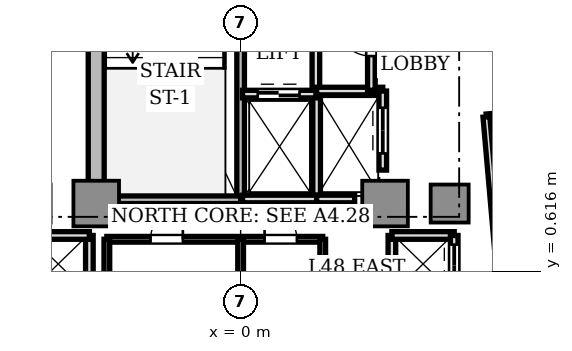
"""IFC4 building model, lengths in metres.
Left out: names, types, materials, properties, quantities, classifications, styles, units other than length and angle.
Written with IfcOpenShell. Run it as: python <this file> out.ifc"""

import sys

from ifc_helpers import new_model, si_unit, direction, frame, frame_2d, origin, origin_2d, place, context, subcontext, project, spatial, rectangle, extrude, source, transform, mapped, element, fill, save


model = new_model("IFC4")
c1 = context("Model", 3, precision=1e-05, world=origin(), true_north=direction((0.0, 1.0)))
c2 = subcontext(c1, "Body", "Model", "MODEL_VIEW")
j1 = project(units=[si_unit("LENGTHUNIT", "METRE"), si_unit("PLANEANGLEUNIT", "RADIAN")], contexts=[c1])
p1 = place(None, origin())
s1 = spatial("IfcSite", under=j1, at=p1, CompositionType="ELEMENT")
p2 = place(p1, origin())
s2 = spatial("IfcBuilding", under=s1, at=p2, CompositionType="ELEMENT")
p3 = place(p2, frame((0.0, 0.0, 175.2)))
s3 = spatial("IfcBuildingStorey", under=s2, at=p3, CompositionType="ELEMENT", Elevation=175.2)
p4 = place(p3, frame((-3.8, 2.85, 0.0), z_axis=(0.0, 0.0, 1.0), x_axis=(0.0, 1.0, 0.0)))
e1 = element("IfcWall", 1, at=p4, inside=s3, PredefinedType="SHEAR", context=c2, shape_type="SweptSolid", body=[
    extrude(rectangle(XDim=6.9, YDim=0.42, at=frame_2d((3.45, 0.0))), origin(), (0.0, 0.0, 1.0), 3.11),
])
m1 = source(origin(), c2, "Body", "SweptSolid", [
    extrude(rectangle(XDim=1.2, YDim=1.2, at=origin_2d()), origin(), (0.0, 0.0, 1.0), 3.11),
])
for number, where, z_axis, x_axis in (
    (2, (-3.8, 2.4, 0.0), (0.0, 0.0, 1.0), (1.0, 0.0, 0.0)),
    (3, (3.8, 2.4, 0.0), (0.0, 0.0, 1.0), (1.0, 0.0, 0.0)),
):
    element("IfcColumn", number, at=place(p3, frame(where, z_axis=z_axis, x_axis=x_axis)), inside=s3, PredefinedType="COLUMN", context=c2, shape_type="MappedRepresentation", body=[
        mapped(m1, transform((0.0, 0.0, 0.0), scale=1.0)),
    ])
m2 = source(origin(), c2, "Body", "SweptSolid", [
    extrude(rectangle(XDim=1.0, YDim=1.0, at=origin_2d()), origin(), (0.0, 0.0, 1.0), 3.11),
])
p5 = place(p3, frame((5.5, 2.4, 0.0), z_axis=(0.0, 0.0, 1.0), x_axis=(1.0, 0.0, 0.0)))
e4 = element("IfcColumn", 4, at=p5, inside=s3, PredefinedType="COLUMN", context=c2, shape_type="MappedRepresentation", body=[
    mapped(m2, transform((0.0, 0.0, 0.0), scale=1.0)),
])
p6 = place(p3, frame((0.0, 2.5, 0.0), z_axis=(0.0, 0.0, 1.0), x_axis=(0.0, 1.0, 0.0)))
e5 = element("IfcWall", 5, at=p6, inside=s3, PredefinedType="SOLIDWALL", context=c2, shape_type="SweptSolid", body=[
    extrude(rectangle(XDim=7.68, YDim=0.2, at=frame_2d((3.84, 0.0))), origin(), (0.0, 0.0, 1.0), 3.11),
])
p7 = place(p6, frame((6.36, 0.0, 0.0)))
e6 = element("IfcOpeningElement", 6, at=p7, cuts=e5, PredefinedType="OPENING", context=c2, shape_type="SweptSolid", body=[
    extrude(rectangle(XDim=1.1, YDim=2.15, at=frame_2d((0.55, 1.075))), frame((0.0, 0.11, 0.0), z_axis=(0.0, -1.0, 0.0), x_axis=(1.0, 0.0, 0.0)), (0.0, 0.0, 1.0), 0.22),
])
p8 = place(p3, frame((-3.72, 2.5, 0.0), z_axis=(0.0, 0.0, 1.0), x_axis=(1.0, 0.0, 0.0)))
e7 = element("IfcWall", 7, at=p8, inside=s3, PredefinedType="SOLIDWALL", context=c2, shape_type="SweptSolid", body=[
    extrude(rectangle(XDim=3.72, YDim=0.2, at=frame_2d((1.86, 0.0))), origin(), (0.0, 0.0, 1.0), 3.11),
])
p9 = place(p3, frame((1.98, 5.32, 0.0), z_axis=(0.0, 0.0, 1.0), x_axis=(0.0, 1.0, 0.0)))
e8 = element("IfcWall", 8, at=p9, inside=s3, PredefinedType="SOLIDWALL", context=c2, shape_type="SweptSolid", body=[
    extrude(rectangle(XDim=4.66, YDim=0.2, at=frame_2d((2.33, 0.0))), origin(), (0.0, 0.0, 1.0), 2.66),
])
p10 = place(p9, frame((3.04, 0.0, 0.0)))
e9 = element("IfcOpeningElement", 9, at=p10, cuts=e8, PredefinedType="OPENING", context=c2, shape_type="SweptSolid", body=[
    extrude(rectangle(XDim=0.85, YDim=2.1, at=frame_2d((0.425, 1.05))), frame((0.0, 0.11, 0.0), z_axis=(0.0, -1.0, 0.0), x_axis=(1.0, 0.0, 0.0)), (0.0, 0.0, 1.0), 0.22),
])
p11 = place(p3, frame((2.0, 2.5, 0.0), z_axis=(0.0, 0.0, 1.0), x_axis=(0.0, 1.0, 0.0)))
e10 = element("IfcWall", 10, at=p11, inside=s3, PredefinedType="SOLIDWALL", context=c2, shape_type="SweptSolid", body=[
    extrude(rectangle(XDim=2.78, YDim=0.2, at=frame_2d((1.39, 0.0))), origin(), (0.0, 0.0, 1.0), 2.66),
])
p12 = place(p3, frame((0.05, 2.52, 0.0), z_axis=(0.0, 0.0, 1.0), x_axis=(1.0, 0.0, 0.0)))
e11 = element("IfcWall", 11, at=p12, inside=s3, PredefinedType="SOLIDWALL", context=c2, shape_type="SweptSolid", body=[
    extrude(rectangle(XDim=1.95, YDim=0.2, at=frame_2d((0.975, 0.0))), origin(), (0.0, 0.0, 1.0), 2.66),
])
p13 = place(p3, frame((0.05, 5.28, 0.0), z_axis=(0.0, 0.0, 1.0), x_axis=(1.0, 0.0, 0.0)))
e12 = element("IfcWall", 12, at=p13, inside=s3, PredefinedType="SOLIDWALL", context=c2, shape_type="SweptSolid", body=[
    extrude(rectangle(XDim=1.93, YDim=0.2, at=frame_2d((0.965, 0.0))), origin(), (0.0, 0.0, 1.0), 2.66),
])
p14 = place(p13, frame((0.4, 0.0, 0.0)))
e13 = element("IfcOpeningElement", 13, at=p14, cuts=e12, PredefinedType="OPENING", context=c2, shape_type="SweptSolid", body=[
    extrude(rectangle(XDim=1.1, YDim=2.2, at=frame_2d((0.55, 1.1))), frame((0.0, 0.11, 0.0), z_axis=(0.0, -1.0, 0.0), x_axis=(1.0, 0.0, 0.0)), (0.0, 0.0, 1.0), 0.22),
])
p15 = place(p3, frame((2.0, 2.52, 0.0), z_axis=(0.0, 0.0, 1.0), x_axis=(1.0, 0.0, 0.0)))
e14 = element("IfcWall", 14, at=p15, inside=s3, PredefinedType="SOLIDWALL", context=c2, shape_type="SweptSolid", body=[
    extrude(rectangle(XDim=1.0, YDim=0.2, at=frame_2d((0.5, 0.0))), origin(), (0.0, 0.0, 1.0), 2.66),
])
p16 = place(p3, frame((2.0, 5.36, 0.0), z_axis=(0.0, 0.0, 1.0), x_axis=(1.0, 0.0, 0.0)))
e15 = element("IfcWall", 15, at=p16, inside=s3, PredefinedType="SOLIDWALL", context=c2, shape_type="SweptSolid", body=[
    extrude(rectangle(XDim=1.74, YDim=0.2, at=frame_2d((0.87, 0.0))), origin(), (0.0, 0.0, 1.0), 2.66),
])
p17 = place(p3, frame((3.74, 3.28, 0.0), z_axis=(0.0, 0.0, 1.0), x_axis=(0.0, 1.0, 0.0)))
e16 = element("IfcWall", 16, at=p17, inside=s3, PredefinedType="SOLIDWALL", context=c2, shape_type="SweptSolid", body=[
    extrude(rectangle(XDim=2.08, YDim=0.2, at=frame_2d((1.04, 0.0))), origin(), (0.0, 0.0, 1.0), 2.66),
])
p18 = place(p17, frame((0.44, 0.0, 0.0)))
e17 = element("IfcOpeningElement", 17, at=p18, cuts=e16, PredefinedType="OPENING", context=c2, shape_type="SweptSolid", body=[
    extrude(rectangle(XDim=1.2, YDim=2.2, at=frame_2d((0.6, 1.1))), frame((0.0, 0.11, 0.0), z_axis=(0.0, -1.0, 0.0), x_axis=(1.0, 0.0, 0.0)), (0.0, 0.0, 1.0), 0.22),
])
p19 = place(p3, frame((3.98, -1.56, 0.0), z_axis=(0.0, 0.0, 1.0), x_axis=(0.0, 1.0, 0.0)))
e18 = element("IfcWall", 18, at=p19, inside=s3, PredefinedType="SOLIDWALL", context=c2, shape_type="SweptSolid", body=[
    extrude(rectangle(XDim=3.12, YDim=0.2, at=frame_2d((1.56, 0.0))), origin(), (0.0, 0.0, 1.0), 2.28),
])
p20 = place(p3, frame((3.98, 1.56, 0.0), z_axis=(0.0, 0.0, 1.0), x_axis=(1.0, 0.0, 0.0)))
e19 = element("IfcWall", 19, at=p20, inside=s3, PredefinedType="SOLIDWALL", context=c2, shape_type="SweptSolid", body=[
    extrude(rectangle(XDim=1.64, YDim=0.2, at=frame_2d((0.82, 0.0))), origin(), (0.0, 0.0, 1.0), 2.66),
])
p21 = place(p3, frame((5.62, 0.0, 0.0), z_axis=(0.0, 0.0, 1.0), x_axis=(0.0, 1.0, 0.0)))
e20 = element("IfcWall", 20, at=p21, inside=s3, PredefinedType="SOLIDWALL", context=c2, shape_type="SweptSolid", body=[
    extrude(rectangle(XDim=1.56, YDim=0.2, at=frame_2d((0.78, 0.0))), origin(), (0.0, 0.0, 1.0), 2.66),
])
p22 = place(p21, frame((0.22, 0.0, 0.0)))
e21 = element("IfcOpeningElement", 21, at=p22, cuts=e20, PredefinedType="OPENING", context=c2, shape_type="SweptSolid", body=[
    extrude(rectangle(XDim=1.1, YDim=2.2, at=frame_2d((0.55, 1.1))), frame((0.0, 0.11, 0.0), z_axis=(0.0, -1.0, 0.0), x_axis=(1.0, 0.0, 0.0)), (0.0, 0.0, 1.0), 0.22),
])
p23 = place(p3, frame((-3.98, -1.56, 0.0), z_axis=(0.0, 0.0, 1.0), x_axis=(0.0, 1.0, 0.0)))
e22 = element("IfcWall", 22, at=p23, inside=s3, PredefinedType="SOLIDWALL", context=c2, shape_type="SweptSolid", body=[
    extrude(rectangle(XDim=3.12, YDim=0.2, at=frame_2d((1.56, 0.0))), origin(), (0.0, 0.0, 1.0), 2.28),
])
p24 = place(p3, frame((-5.62, 1.56, 0.0), z_axis=(0.0, 0.0, 1.0), x_axis=(1.0, 0.0, 0.0)))
e23 = element("IfcWall", 23, at=p24, inside=s3, PredefinedType="SOLIDWALL", context=c2, shape_type="SweptSolid", body=[
    extrude(rectangle(XDim=1.64, YDim=0.2, at=frame_2d((0.82, 0.0))), origin(), (0.0, 0.0, 1.0), 2.66),
])
p25 = place(p3, frame((3.44, 5.38, 0.0), z_axis=(0.0, 0.0, 1.0), x_axis=(0.0, 1.0, 0.0)))
e24 = element("IfcWall", 24, at=p25, inside=s3, PredefinedType="SOLIDWALL", context=c2, shape_type="SweptSolid", body=[
    extrude(rectangle(XDim=2.77, YDim=0.2, at=frame_2d((1.385, 0.0))), origin(), (0.0, 0.0, 1.0), 2.66),
])
p26 = place(p25, frame((0.9, 0.0, 0.0)))
e25 = element("IfcOpeningElement", 25, at=p26, cuts=e24, PredefinedType="OPENING", context=c2, shape_type="SweptSolid", body=[
    extrude(rectangle(XDim=0.95, YDim=2.15, at=frame_2d((0.475, 1.075))), frame((0.0, 0.11, 0.0), z_axis=(0.0, -1.0, 0.0), x_axis=(1.0, 0.0, 0.0)), (0.0, 0.0, 1.0), 0.22),
])
p27 = place(p3, frame((-3.52, 1.46, 0.0), z_axis=(0.0, 0.0, 1.0), x_axis=(1.0, 0.0, 0.0)))
e26 = element("IfcWall", 26, at=p27, inside=s3, PredefinedType="PARTITIONING", context=c2, shape_type="SweptSolid", body=[
    extrude(rectangle(XDim=5.68, YDim=0.15, at=frame_2d((2.84, 0.0))), origin(), (0.0, 0.0, 1.0), 2.66),
])
p28 = place(p27, frame((1.15, 0.0, 0.0)))
e27 = element("IfcOpeningElement", 27, at=p28, cuts=e26, PredefinedType="OPENING", context=c2, shape_type="SweptSolid", body=[
    extrude(rectangle(XDim=0.85, YDim=2.1, at=frame_2d((0.425, 1.05))), frame((0.0, 0.085, 0.0), z_axis=(0.0, -1.0, 0.0), x_axis=(1.0, 0.0, 0.0)), (0.0, 0.0, 1.0), 0.17),
])
p29 = place(p27, frame((4.15, 0.0, 0.0)))
e28 = element("IfcOpeningElement", 28, at=p29, cuts=e26, PredefinedType="OPENING", context=c2, shape_type="SweptSolid", body=[
    extrude(rectangle(XDim=0.85, YDim=2.1, at=frame_2d((0.425, 1.05))), frame((0.0, 0.085, 0.0), z_axis=(0.0, -1.0, 0.0), x_axis=(1.0, 0.0, 0.0)), (0.0, 0.0, 1.0), 0.17),
])
p30 = place(p3, frame((-3.52, 0.1, 0.0), z_axis=(0.0, 0.0, 1.0), x_axis=(0.0, 1.0, 0.0)))
e29 = element("IfcWall", 29, at=p30, inside=s3, PredefinedType="PARTITIONING", context=c2, shape_type="SweptSolid", body=[
    extrude(rectangle(XDim=1.36, YDim=0.15, at=frame_2d((0.68, 0.0))), origin(), (0.0, 0.0, 1.0), 2.28),
])
for number, where, z_axis, x_axis in (
    (30, (2.16, 0.1, 0.0), (0.0, 0.0, 1.0), (0.0, 1.0, 0.0)),
    (31, (0.0, 0.1, 0.0), (0.0, 0.0, 1.0), (0.0, 1.0, 0.0)),
):
    element("IfcWall", number, at=place(p3, frame(where, z_axis=z_axis, x_axis=x_axis)), inside=s3, PredefinedType="PARTITIONING", context=c2, shape_type="SweptSolid", body=[
        extrude(rectangle(XDim=1.36, YDim=0.15, at=frame_2d((0.68, 0.0))), origin(), (0.0, 0.0, 1.0), 2.66),
    ])
p31 = place(p3, frame((6.467, 4.681, 0.0), z_axis=(0.0, 0.0, 1.0), x_axis=(0.996195452949, 0.087147114263, 0.0)))
e32 = element("IfcWall", 32, at=p31, inside=s3, PredefinedType="PARTITIONING", context=c2, shape_type="SweptSolid", body=[
    extrude(rectangle(XDim=8.55, YDim=0.15, at=frame_2d((4.275, 0.0))), origin(), (0.0, 0.0, 1.0), 2.66),
])
p32 = place(p31, frame((1.491, 0.0, 0.0)))
e33 = element("IfcOpeningElement", 33, at=p32, cuts=e32, PredefinedType="OPENING", context=c2, shape_type="SweptSolid", body=[
    extrude(rectangle(XDim=0.85, YDim=2.1, at=frame_2d((0.425, 1.05))), frame((0.0, 0.085, 0.0), z_axis=(0.0, -1.0, 0.0), x_axis=(1.0, 0.0, 0.0)), (0.0, 0.0, 1.0), 0.17),
])
p33 = place(p31, frame((4.792, 0.0, 0.0)))
e34 = element("IfcOpeningElement", 34, at=p33, cuts=e32, PredefinedType="OPENING", context=c2, shape_type="SweptSolid", body=[
    extrude(rectangle(XDim=0.85, YDim=2.1, at=frame_2d((0.425, 1.05))), frame((0.0, 0.085, 0.0), z_axis=(0.0, -1.0, 0.0), x_axis=(1.0, 0.0, 0.0)), (0.0, 0.0, 1.0), 0.17),
])
p34 = place(p3, frame((7.373, -5.679, 0.0), z_axis=(0.0, 0.0, 1.0), x_axis=(-0.087163455754, 0.996194023261, 0.0)))
e35 = element("IfcWall", 35, at=p34, inside=s3, PredefinedType="PARTITIONING", context=c2, shape_type="SweptSolid", body=[
    extrude(rectangle(XDim=10.4, YDim=0.18, at=frame_2d((5.2, 0.0))), origin(), (0.0, 0.0, 1.0), 2.66),
])
m3 = source(origin(), c2, "Body", "SweptSolid", [
    extrude(rectangle(XDim=1.1, YDim=0.05, at=origin_2d()), origin(), (0.0, 0.0, 1.0), 2.2),
])
p35 = place(p14, frame((0.55, 0.0, 0.0)))
e36 = element("IfcDoor", 36, at=p35, inside=s3, OperationType="DOUBLE_DOOR_SLIDING", PredefinedType="DOOR", context=c2, shape_type="MappedRepresentation", body=[
    mapped(m3, transform((0.0, 0.0, 0.0), scale=1.0)),
])
fill(e13, e36)
m4 = source(origin(), c2, "Body", "SweptSolid", [
    extrude(rectangle(XDim=1.2, YDim=0.05, at=origin_2d()), origin(), (0.0, 0.0, 1.0), 2.2),
])
p36 = place(p18, frame((0.6, 0.0, 0.0)))
e37 = element("IfcDoor", 37, at=p36, inside=s3, OperationType="DOUBLE_DOOR_SLIDING", PredefinedType="DOOR", context=c2, shape_type="MappedRepresentation", body=[
    mapped(m4, transform((0.0, 0.0, 0.0), scale=1.0)),
])
fill(e17, e37)
p37 = place(p22, frame((0.55, 0.0, 0.0)))
e38 = element("IfcDoor", 38, at=p37, inside=s3, OperationType="DOUBLE_DOOR_SLIDING", PredefinedType="DOOR", context=c2, shape_type="MappedRepresentation", body=[
    mapped(m3, transform((0.0, 0.0, 0.0), scale=1.0)),
])
fill(e21, e38)
m5 = source(origin(), c2, "Body", "SweptSolid", [
    extrude(rectangle(XDim=0.95, YDim=0.05, at=origin_2d()), origin(), (0.0, 0.0, 1.0), 2.15),
])
p38 = place(p26, frame((0.475, 0.0, 0.0)))
e39 = element("IfcDoor", 39, at=p38, inside=s3, OperationType="SINGLE_SWING_RIGHT", PredefinedType="DOOR", context=c2, shape_type="MappedRepresentation", body=[
    mapped(m5, transform((0.0, 0.0, 0.0), scale=1.0)),
])
fill(e25, e39)
m6 = source(origin(), c2, "Body", "SweptSolid", [
    extrude(rectangle(XDim=0.85, YDim=0.05, at=origin_2d()), origin(), (0.0, 0.0, 1.0), 2.1),
])
p39 = place(p28, frame((0.425, 0.0, 0.0)))
e40 = element("IfcDoor", 40, at=p39, inside=s3, OperationType="SINGLE_SWING_RIGHT", PredefinedType="DOOR", context=c2, shape_type="MappedRepresentation", body=[
    mapped(m6, transform((0.0, 0.0, 0.0), scale=1.0)),
])
fill(e27, e40)
p40 = place(p29, frame((0.425, 0.0, 0.0)))
e41 = element("IfcDoor", 41, at=p40, inside=s3, OperationType="SINGLE_SWING_LEFT", PredefinedType="DOOR", context=c2, shape_type="MappedRepresentation", body=[
    mapped(m6, transform((0.0, 0.0, 0.0), scale=1.0)),
])
fill(e28, e41)
save(model, sys.argv[1])
